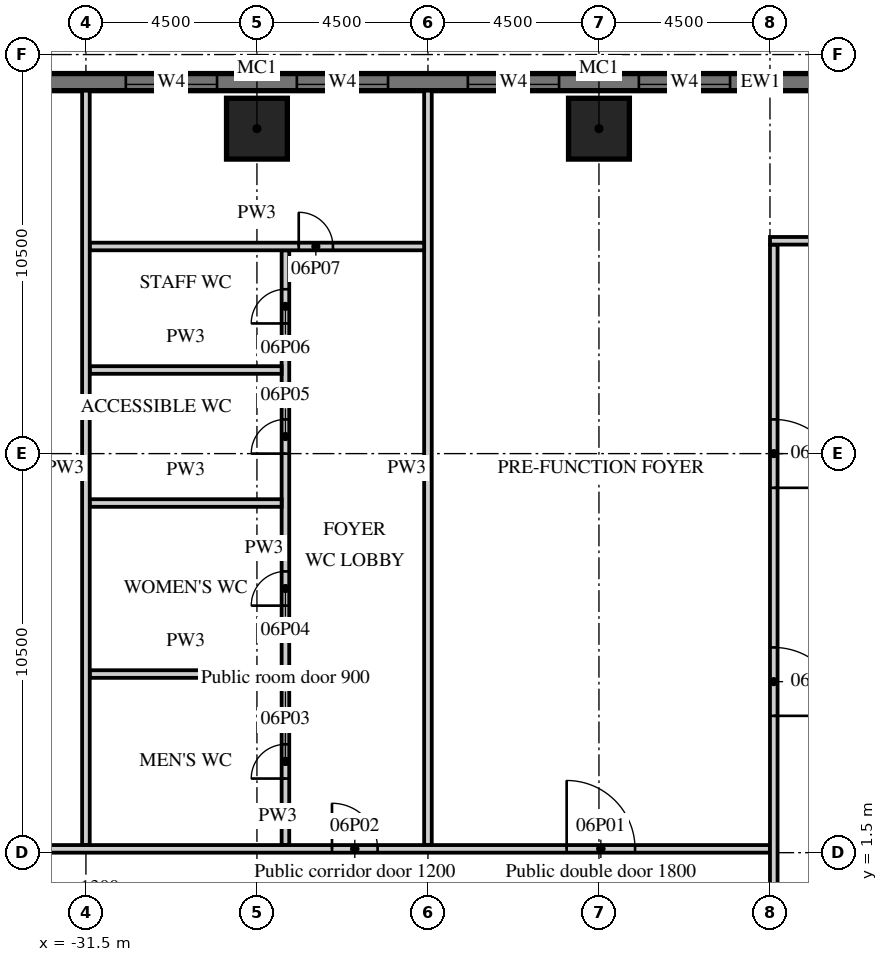
"""IFC4 building model, lengths in metres.
Left out: names, types, materials, properties, quantities, classifications, styles, units other than length and angle.
Written with IfcOpenShell. Run it as: python <this file> out.ifc"""

import sys

from ifc_helpers import new_model, si_unit, direction, frame, frame_2d, origin, origin_2d, place, context, subcontext, project, spatial, rectangle, extrude, element, fill, save


model = new_model("IFC4")
c1 = context("Model", 3, precision=1e-05, world=origin(), true_north=direction((0.0, 1.0)))
c2 = subcontext(c1, "Body", "Model", "MODEL_VIEW")
j1 = project(units=[si_unit("LENGTHUNIT", "METRE"), si_unit("PLANEANGLEUNIT", "RADIAN")], contexts=[c1])
p1 = place(None, origin())
s1 = spatial("IfcSite", under=j1, at=p1, CompositionType="ELEMENT")
p2 = place(p1, origin())
s2 = spatial("IfcBuilding", under=s1, at=p2, CompositionType="ELEMENT")
p3 = place(p2, frame((0.0, 0.0, 38.0)))
s3 = spatial("IfcBuildingStorey", under=s2, at=p3, CompositionType="ELEMENT", Elevation=38.0)
for number, where, z_axis, x_axis in (
    (1, (-27.0, 20.55, 0.0), (0.0, 0.0, 1.0), (1.0, 0.0, 0.0)),
    (2, (-18.0, 20.55, 0.0), (0.0, 0.0, 1.0), (1.0, 0.0, 0.0)),
):
    element("IfcColumn", number, at=place(p3, frame(where, z_axis=z_axis, x_axis=x_axis)), inside=s3, PredefinedType="COLUMN", context=c2, shape_type="SweptSolid", body=[
        extrude(rectangle(XDim=1.6, YDim=1.6, at=origin_2d()), origin(), (0.0, 0.0, 1.0), 8.7),
    ])
p4 = place(p3, frame((13.5, 21.775, 0.0), z_axis=(0.0, 0.0, 1.0), x_axis=(-1.0, 0.0, 0.0)))
e3 = element("IfcWall", 3, at=p4, inside=s3, PredefinedType="SOLIDWALL", context=c2, shape_type="SweptSolid", body=[
    extrude(rectangle(XDim=54.5, YDim=0.45, at=frame_2d((27.25, 0.0))), origin(), (0.0, 0.0, 1.0), 8.7),
])
p5 = place(p4, frame((1.05, 0.0, 0.9)))
e4 = element("IfcOpeningElement", 4, at=p5, cuts=e3, PredefinedType="OPENING", context=c2, shape_type="SweptSolid", body=[
    extrude(rectangle(XDim=2.4, YDim=1.8, at=frame_2d((1.2, 0.9))), frame((0.0, 0.235, 0.0), z_axis=(0.0, -1.0, 0.0), x_axis=(1.0, 0.0, 0.0)), (0.0, 0.0, 1.0), 0.47),
])
p6 = place(p4, frame((5.55, 0.0, 0.9)))
e5 = element("IfcOpeningElement", 5, at=p6, cuts=e3, PredefinedType="OPENING", context=c2, shape_type="SweptSolid", body=[
    extrude(rectangle(XDim=2.4, YDim=1.8, at=frame_2d((1.2, 0.9))), frame((0.0, 0.235, 0.0), z_axis=(0.0, -1.0, 0.0), x_axis=(1.0, 0.0, 0.0)), (0.0, 0.0, 1.0), 0.47),
])
p7 = place(p4, frame((10.05, 0.0, 0.9)))
e6 = element("IfcOpeningElement", 6, at=p7, cuts=e3, PredefinedType="OPENING", context=c2, shape_type="SweptSolid", body=[
    extrude(rectangle(XDim=2.4, YDim=1.8, at=frame_2d((1.2, 0.9))), frame((0.0, 0.235, 0.0), z_axis=(0.0, -1.0, 0.0), x_axis=(1.0, 0.0, 0.0)), (0.0, 0.0, 1.0), 0.47),
])
p8 = place(p4, frame((14.55, 0.0, 0.9)))
e7 = element("IfcOpeningElement", 7, at=p8, cuts=e3, PredefinedType="OPENING", context=c2, shape_type="SweptSolid", body=[
    extrude(rectangle(XDim=2.4, YDim=1.8, at=frame_2d((1.2, 0.9))), frame((0.0, 0.235, 0.0), z_axis=(0.0, -1.0, 0.0), x_axis=(1.0, 0.0, 0.0)), (0.0, 0.0, 1.0), 0.47),
])
p9 = place(p4, frame((19.05, 0.0, 0.9)))
e8 = element("IfcOpeningElement", 8, at=p9, cuts=e3, PredefinedType="OPENING", context=c2, shape_type="SweptSolid", body=[
    extrude(rectangle(XDim=2.4, YDim=1.8, at=frame_2d((1.2, 0.9))), frame((0.0, 0.235, 0.0), z_axis=(0.0, -1.0, 0.0), x_axis=(1.0, 0.0, 0.0)), (0.0, 0.0, 1.0), 0.47),
])
p10 = place(p4, frame((23.55, 0.0, 0.9)))
e9 = element("IfcOpeningElement", 9, at=p10, cuts=e3, PredefinedType="OPENING", context=c2, shape_type="SweptSolid", body=[
    extrude(rectangle(XDim=2.4, YDim=1.8, at=frame_2d((1.2, 0.9))), frame((0.0, 0.235, 0.0), z_axis=(0.0, -1.0, 0.0), x_axis=(1.0, 0.0, 0.0)), (0.0, 0.0, 1.0), 0.47),
])
p11 = place(p4, frame((28.05, 0.0, 0.9)))
e10 = element("IfcOpeningElement", 10, at=p11, cuts=e3, PredefinedType="OPENING", context=c2, shape_type="SweptSolid", body=[
    extrude(rectangle(XDim=2.4, YDim=1.8, at=frame_2d((1.2, 0.9))), frame((0.0, 0.235, 0.0), z_axis=(0.0, -1.0, 0.0), x_axis=(1.0, 0.0, 0.0)), (0.0, 0.0, 1.0), 0.47),
])
p12 = place(p4, frame((32.55, 0.0, 0.9)))
e11 = element("IfcOpeningElement", 11, at=p12, cuts=e3, PredefinedType="OPENING", context=c2, shape_type="SweptSolid", body=[
    extrude(rectangle(XDim=2.4, YDim=1.8, at=frame_2d((1.2, 0.9))), frame((0.0, 0.235, 0.0), z_axis=(0.0, -1.0, 0.0), x_axis=(1.0, 0.0, 0.0)), (0.0, 0.0, 1.0), 0.47),
])
p13 = place(p4, frame((37.05, 0.0, 0.9)))
e12 = element("IfcOpeningElement", 12, at=p13, cuts=e3, PredefinedType="OPENING", context=c2, shape_type="SweptSolid", body=[
    extrude(rectangle(XDim=2.4, YDim=1.8, at=frame_2d((1.2, 0.9))), frame((0.0, 0.235, 0.0), z_axis=(0.0, -1.0, 0.0), x_axis=(1.0, 0.0, 0.0)), (0.0, 0.0, 1.0), 0.47),
])
p14 = place(p4, frame((41.55, 0.0, 0.9)))
e13 = element("IfcOpeningElement", 13, at=p14, cuts=e3, PredefinedType="OPENING", context=c2, shape_type="SweptSolid", body=[
    extrude(rectangle(XDim=2.4, YDim=1.8, at=frame_2d((1.2, 0.9))), frame((0.0, 0.235, 0.0), z_axis=(0.0, -1.0, 0.0), x_axis=(1.0, 0.0, 0.0)), (0.0, 0.0, 1.0), 0.47),
])
p15 = place(p4, frame((46.05, 0.0, 0.9)))
e14 = element("IfcOpeningElement", 14, at=p15, cuts=e3, PredefinedType="OPENING", context=c2, shape_type="SweptSolid", body=[
    extrude(rectangle(XDim=2.4, YDim=1.8, at=frame_2d((1.2, 0.9))), frame((0.0, 0.235, 0.0), z_axis=(0.0, -1.0, 0.0), x_axis=(1.0, 0.0, 0.0)), (0.0, 0.0, 1.0), 0.47),
])
p16 = place(p3, frame((-22.5, 1.7, 0.0), z_axis=(0.0, 0.0, 1.0), x_axis=(0.0, 1.0, 0.0)))
e15 = element("IfcWall", 15, at=p16, inside=s3, PredefinedType="PARTITIONING", context=c2, shape_type="SweptSolid", body=[
    extrude(rectangle(XDim=19.85, YDim=0.2, at=frame_2d((9.925, 0.0))), origin(), (0.0, 0.0, 1.0), 8.7),
])
p17 = place(p3, frame((-26.25, 1.7, 0.0), z_axis=(0.0, 0.0, 1.0), x_axis=(0.0, 1.0, 0.0)))
e16 = element("IfcWall", 16, at=p17, inside=s3, PredefinedType="PARTITIONING", context=c2, shape_type="SweptSolid", body=[
    extrude(rectangle(XDim=15.65, YDim=0.2, at=frame_2d((7.825, 0.0))), origin(), (0.0, 0.0, 1.0), 8.7),
])
p18 = place(p17, frame((1.75, 0.0, 0.0)))
e17 = element("IfcOpeningElement", 17, at=p18, cuts=e16, PredefinedType="OPENING", context=c2, shape_type="SweptSolid", body=[
    extrude(rectangle(XDim=0.9, YDim=2.1, at=frame_2d((0.45, 1.05))), frame((0.0, 0.11, 0.0), z_axis=(0.0, -1.0, 0.0), x_axis=(1.0, 0.0, 0.0)), (0.0, 0.0, 1.0), 0.22),
])
p19 = place(p17, frame((6.3, 0.0, 0.0)))
e18 = element("IfcOpeningElement", 18, at=p19, cuts=e16, PredefinedType="OPENING", context=c2, shape_type="SweptSolid", body=[
    extrude(rectangle(XDim=0.9, YDim=2.1, at=frame_2d((0.45, 1.05))), frame((0.0, 0.11, 0.0), z_axis=(0.0, -1.0, 0.0), x_axis=(1.0, 0.0, 0.0)), (0.0, 0.0, 1.0), 0.22),
])
p20 = place(p17, frame((10.3, 0.0, 0.0)))
e19 = element("IfcOpeningElement", 19, at=p20, cuts=e16, PredefinedType="OPENING", context=c2, shape_type="SweptSolid", body=[
    extrude(rectangle(XDim=0.9, YDim=2.1, at=frame_2d((0.45, 1.05))), frame((0.0, 0.11, 0.0), z_axis=(0.0, -1.0, 0.0), x_axis=(1.0, 0.0, 0.0)), (0.0, 0.0, 1.0), 0.22),
])
p21 = place(p17, frame((13.725, 0.0, 0.0)))
e20 = element("IfcOpeningElement", 20, at=p21, cuts=e16, PredefinedType="OPENING", context=c2, shape_type="SweptSolid", body=[
    extrude(rectangle(XDim=0.9, YDim=2.1, at=frame_2d((0.45, 1.05))), frame((0.0, 0.11, 0.0), z_axis=(0.0, -1.0, 0.0), x_axis=(1.0, 0.0, 0.0)), (0.0, 0.0, 1.0), 0.22),
])
for number, where, z_axis, x_axis in (
    (21, (-31.4, 6.2, 0.0), (0.0, 0.0, 1.0), (1.0, 0.0, 0.0)),
    (22, (-31.4, 10.7, 0.0), (0.0, 0.0, 1.0), (1.0, 0.0, 0.0)),
    (23, (-31.4, 14.2, 0.0), (0.0, 0.0, 1.0), (1.0, 0.0, 0.0)),
):
    element("IfcWall", number, at=place(p3, frame(where, z_axis=z_axis, x_axis=x_axis)), inside=s3, PredefinedType="PARTITIONING", context=c2, shape_type="SweptSolid", body=[
        extrude(rectangle(XDim=5.05, YDim=0.2, at=frame_2d((2.525, 0.0))), origin(), (0.0, 0.0, 1.0), 8.7),
    ])
p22 = place(p3, frame((-31.4, 17.45, 0.0), z_axis=(0.0, 0.0, 1.0), x_axis=(1.0, 0.0, 0.0)))
e24 = element("IfcWall", 24, at=p22, inside=s3, PredefinedType="PARTITIONING", context=c2, shape_type="SweptSolid", body=[
    extrude(rectangle(XDim=8.8, YDim=0.2, at=frame_2d((4.4, 0.0))), origin(), (0.0, 0.0, 1.0), 8.7),
])
p23 = place(p22, frame((5.5, 0.0, 0.0)))
e25 = element("IfcOpeningElement", 25, at=p23, cuts=e24, PredefinedType="OPENING", context=c2, shape_type="SweptSolid", body=[
    extrude(rectangle(XDim=0.9, YDim=2.1, at=frame_2d((0.45, 1.05))), frame((0.0, 0.11, 0.0), z_axis=(0.0, -1.0, 0.0), x_axis=(1.0, 0.0, 0.0)), (0.0, 0.0, 1.0), 0.22),
])
p24 = place(p3, frame((-31.5, 1.7, 0.0), z_axis=(0.0, 0.0, 1.0), x_axis=(0.0, 1.0, 0.0)))
e26 = element("IfcWall", 26, at=p24, inside=s3, PredefinedType="PARTITIONING", context=c2, shape_type="SweptSolid", body=[
    extrude(rectangle(XDim=19.85, YDim=0.2, at=frame_2d((9.925, 0.0))), origin(), (0.0, 0.0, 1.0), 8.7),
])
p25 = place(p3, frame((-39.4, 1.6, 0.0), z_axis=(0.0, 0.0, 1.0), x_axis=(1.0, 0.0, 0.0)))
e27 = element("IfcWall", 27, at=p25, inside=s3, PredefinedType="PARTITIONING", context=c2, shape_type="SweptSolid", body=[
    extrude(rectangle(XDim=25.9, YDim=0.2, at=frame_2d((12.95, 0.0))), origin(), (0.0, 0.0, 1.0), 8.7),
])
p26 = place(p25, frame((20.55, 0.0, 0.0)))
e28 = element("IfcOpeningElement", 28, at=p26, cuts=e27, PredefinedType="OPENING", context=c2, shape_type="SweptSolid", body=[
    extrude(rectangle(XDim=1.8, YDim=2.1, at=frame_2d((0.9, 1.05))), frame((0.0, 0.11, 0.0), z_axis=(0.0, -1.0, 0.0), x_axis=(1.0, 0.0, 0.0)), (0.0, 0.0, 1.0), 0.22),
])
p27 = place(p25, frame((14.375, 0.0, 0.0)))
e29 = element("IfcOpeningElement", 29, at=p27, cuts=e27, PredefinedType="OPENING", context=c2, shape_type="SweptSolid", body=[
    extrude(rectangle(XDim=1.2, YDim=2.1, at=frame_2d((0.6, 1.05))), frame((0.0, 0.11, 0.0), z_axis=(0.0, -1.0, 0.0), x_axis=(1.0, 0.0, 0.0)), (0.0, 0.0, 1.0), 0.22),
])
p28 = place(p25, frame((3.1, 0.0, 0.0)))
e30 = element("IfcOpeningElement", 30, at=p28, cuts=e27, PredefinedType="OPENING", context=c2, shape_type="SweptSolid", body=[
    extrude(rectangle(XDim=1.8, YDim=2.1, at=frame_2d((0.9, 1.05))), frame((0.0, 0.11, 0.0), z_axis=(0.0, -1.0, 0.0), x_axis=(1.0, 0.0, 0.0)), (0.0, 0.0, 1.0), 0.22),
])
p29 = place(p3, frame((-13.4, -17.5, 0.0), z_axis=(0.0, 0.0, 1.0), x_axis=(0.0, 1.0, 0.0)))
e31 = element("IfcWall", 31, at=p29, inside=s3, PredefinedType="PARTITIONING", context=c2, shape_type="SweptSolid", body=[
    extrude(rectangle(XDim=35.0, YDim=0.2, at=frame_2d((17.5, 0.0))), origin(), (0.0, 0.0, 1.0), 8.7),
])
p30 = place(p29, frame((22.6, 0.0, 0.0)))
e32 = element("IfcOpeningElement", 32, at=p30, cuts=e31, PredefinedType="OPENING", context=c2, shape_type="SweptSolid", body=[
    extrude(rectangle(XDim=1.8, YDim=2.1, at=frame_2d((0.9, 1.05))), frame((0.0, 0.11, 0.0), z_axis=(0.0, -1.0, 0.0), x_axis=(1.0, 0.0, 0.0)), (0.0, 0.0, 1.0), 0.22),
])
p31 = place(p29, frame((28.6, 0.0, 0.0)))
e33 = element("IfcOpeningElement", 33, at=p31, cuts=e31, PredefinedType="OPENING", context=c2, shape_type="SweptSolid", body=[
    extrude(rectangle(XDim=1.8, YDim=2.1, at=frame_2d((0.9, 1.05))), frame((0.0, 0.11, 0.0), z_axis=(0.0, -1.0, 0.0), x_axis=(1.0, 0.0, 0.0)), (0.0, 0.0, 1.0), 0.22),
])
p32 = place(p3, frame((-13.5, 17.6, 0.0), z_axis=(0.0, 0.0, 1.0), x_axis=(1.0, 0.0, 0.0)))
e34 = element("IfcWall", 34, at=p32, inside=s3, PredefinedType="PARTITIONING", context=c2, shape_type="SweptSolid", body=[
    extrude(rectangle(XDim=27.0, YDim=0.2, at=frame_2d((13.5, 0.0))), origin(), (0.0, 0.0, 1.0), 8.7),
])
p33 = place(p32, frame((4.6, 0.0, 0.0)))
e35 = element("IfcOpeningElement", 35, at=p33, cuts=e34, PredefinedType="OPENING", context=c2, shape_type="SweptSolid", body=[
    extrude(rectangle(XDim=1.8, YDim=2.1, at=frame_2d((0.9, 1.05))), frame((0.0, 0.11, 0.0), z_axis=(0.0, -1.0, 0.0), x_axis=(1.0, 0.0, 0.0)), (0.0, 0.0, 1.0), 0.22),
])
p34 = place(p32, frame((12.6, 0.0, 0.0)))
e36 = element("IfcOpeningElement", 36, at=p34, cuts=e34, PredefinedType="OPENING", context=c2, shape_type="SweptSolid", body=[
    extrude(rectangle(XDim=1.8, YDim=2.1, at=frame_2d((0.9, 1.05))), frame((0.0, 0.11, 0.0), z_axis=(0.0, -1.0, 0.0), x_axis=(1.0, 0.0, 0.0)), (0.0, 0.0, 1.0), 0.22),
])
p35 = place(p32, frame((20.6, 0.0, 0.0)))
e37 = element("IfcOpeningElement", 37, at=p35, cuts=e34, PredefinedType="OPENING", context=c2, shape_type="SweptSolid", body=[
    extrude(rectangle(XDim=1.8, YDim=2.1, at=frame_2d((0.9, 1.05))), frame((0.0, 0.11, 0.0), z_axis=(0.0, -1.0, 0.0), x_axis=(1.0, 0.0, 0.0)), (0.0, 0.0, 1.0), 0.22),
])
p36 = place(p11, origin())
e38 = element("IfcWindow", 38, at=p36, inside=s3, PartitioningType="SINGLE_PANEL", PredefinedType="WINDOW", context=c2, shape_type="SweptSolid", body=[
    extrude(rectangle(XDim=2.4, YDim=1.8, at=frame_2d((1.2, 0.9))), frame((0.0, 0.09, 0.0), z_axis=(0.0, -1.0, 0.0), x_axis=(1.0, 0.0, 0.0)), (0.0, 0.0, 1.0), 0.06),
])
fill(e10, e38)
p37 = place(p12, origin())
e39 = element("IfcWindow", 39, at=p37, inside=s3, PartitioningType="SINGLE_PANEL", PredefinedType="WINDOW", context=c2, shape_type="SweptSolid", body=[
    extrude(rectangle(XDim=2.4, YDim=1.8, at=frame_2d((1.2, 0.9))), frame((0.0, 0.09, 0.0), z_axis=(0.0, -1.0, 0.0), x_axis=(1.0, 0.0, 0.0)), (0.0, 0.0, 1.0), 0.06),
])
fill(e11, e39)
p38 = place(p13, origin())
e40 = element("IfcWindow", 40, at=p38, inside=s3, PartitioningType="SINGLE_PANEL", PredefinedType="WINDOW", context=c2, shape_type="SweptSolid", body=[
    extrude(rectangle(XDim=2.4, YDim=1.8, at=frame_2d((1.2, 0.9))), frame((0.0, 0.09, 0.0), z_axis=(0.0, -1.0, 0.0), x_axis=(1.0, 0.0, 0.0)), (0.0, 0.0, 1.0), 0.06),
])
fill(e12, e40)
p39 = place(p14, origin())
e41 = element("IfcWindow", 41, at=p39, inside=s3, PartitioningType="SINGLE_PANEL", PredefinedType="WINDOW", context=c2, shape_type="SweptSolid", body=[
    extrude(rectangle(XDim=2.4, YDim=1.8, at=frame_2d((1.2, 0.9))), frame((0.0, 0.09, 0.0), z_axis=(0.0, -1.0, 0.0), x_axis=(1.0, 0.0, 0.0)), (0.0, 0.0, 1.0), 0.06),
])
fill(e13, e41)
p40 = place(p26, origin())
e42 = element("IfcDoor", 42, at=p40, inside=s3, OperationType="DOUBLE_DOOR_DOUBLE_SWING", PredefinedType="DOOR", context=c2, shape_type="SweptSolid", body=[
    extrude(rectangle(XDim=1.8, YDim=2.1, at=frame_2d((0.9, 1.05))), frame((0.0, 0.025, 0.0), z_axis=(0.0, -1.0, 0.0), x_axis=(1.0, 0.0, 0.0)), (0.0, 0.0, 1.0), 0.05),
])
fill(e28, e42)
p41 = place(p27, origin())
e43 = element("IfcDoor", 43, at=p41, inside=s3, OperationType="SINGLE_SWING_LEFT", PredefinedType="DOOR", context=c2, shape_type="SweptSolid", body=[
    extrude(rectangle(XDim=1.2, YDim=2.1, at=frame_2d((0.6, 1.05))), frame((0.0, 0.025, 0.0), z_axis=(0.0, -1.0, 0.0), x_axis=(1.0, 0.0, 0.0)), (0.0, 0.0, 1.0), 0.05),
])
fill(e29, e43)
p42 = place(p18, origin())
e44 = element("IfcDoor", 44, at=p42, inside=s3, OperationType="SINGLE_SWING_LEFT", PredefinedType="DOOR", context=c2, shape_type="SweptSolid", body=[
    extrude(rectangle(XDim=0.9, YDim=2.1, at=frame_2d((0.45, 1.05))), frame((0.0, 0.025, 0.0), z_axis=(0.0, -1.0, 0.0), x_axis=(1.0, 0.0, 0.0)), (0.0, 0.0, 1.0), 0.05),
])
fill(e17, e44)
p43 = place(p19, origin())
e45 = element("IfcDoor", 45, at=p43, inside=s3, OperationType="SINGLE_SWING_LEFT", PredefinedType="DOOR", context=c2, shape_type="SweptSolid", body=[
    extrude(rectangle(XDim=0.9, YDim=2.1, at=frame_2d((0.45, 1.05))), frame((0.0, 0.025, 0.0), z_axis=(0.0, -1.0, 0.0), x_axis=(1.0, 0.0, 0.0)), (0.0, 0.0, 1.0), 0.05),
])
fill(e18, e45)
p44 = place(p20, origin())
e46 = element("IfcDoor", 46, at=p44, inside=s3, OperationType="SINGLE_SWING_LEFT", PredefinedType="DOOR", context=c2, shape_type="SweptSolid", body=[
    extrude(rectangle(XDim=0.9, YDim=2.1, at=frame_2d((0.45, 1.05))), frame((0.0, 0.025, 0.0), z_axis=(0.0, -1.0, 0.0), x_axis=(1.0, 0.0, 0.0)), (0.0, 0.0, 1.0), 0.05),
])
fill(e19, e46)
p45 = place(p21, origin())
e47 = element("IfcDoor", 47, at=p45, inside=s3, OperationType="SINGLE_SWING_LEFT", PredefinedType="DOOR", context=c2, shape_type="SweptSolid", body=[
    extrude(rectangle(XDim=0.9, YDim=2.1, at=frame_2d((0.45, 1.05))), frame((0.0, 0.025, 0.0), z_axis=(0.0, -1.0, 0.0), x_axis=(1.0, 0.0, 0.0)), (0.0, 0.0, 1.0), 0.05),
])
fill(e20, e47)
p46 = place(p23, origin())
e48 = element("IfcDoor", 48, at=p46, inside=s3, OperationType="SINGLE_SWING_LEFT", PredefinedType="DOOR", context=c2, shape_type="SweptSolid", body=[
    extrude(rectangle(XDim=0.9, YDim=2.1, at=frame_2d((0.45, 1.05))), frame((0.0, 0.025, 0.0), z_axis=(0.0, -1.0, 0.0), x_axis=(1.0, 0.0, 0.0)), (0.0, 0.0, 1.0), 0.05),
])
fill(e25, e48)
p47 = place(p30, origin())
e49 = element("IfcDoor", 49, at=p47, inside=s3, OperationType="DOUBLE_DOOR_DOUBLE_SWING", PredefinedType="DOOR", context=c2, shape_type="SweptSolid", body=[
    extrude(rectangle(XDim=1.8, YDim=2.1, at=frame_2d((0.9, 1.05))), frame((0.0, 0.025, 0.0), z_axis=(0.0, -1.0, 0.0), x_axis=(1.0, 0.0, 0.0)), (0.0, 0.0, 1.0), 0.05),
])
fill(e32, e49)
p48 = place(p31, origin())
e50 = element("IfcDoor", 50, at=p48, inside=s3, OperationType="DOUBLE_DOOR_DOUBLE_SWING", PredefinedType="DOOR", context=c2, shape_type="SweptSolid", body=[
    extrude(rectangle(XDim=1.8, YDim=2.1, at=frame_2d((0.9, 1.05))), frame((0.0, 0.025, 0.0), z_axis=(0.0, -1.0, 0.0), x_axis=(1.0, 0.0, 0.0)), (0.0, 0.0, 1.0), 0.05),
])
fill(e33, e50)
save(model, sys.argv[1])
